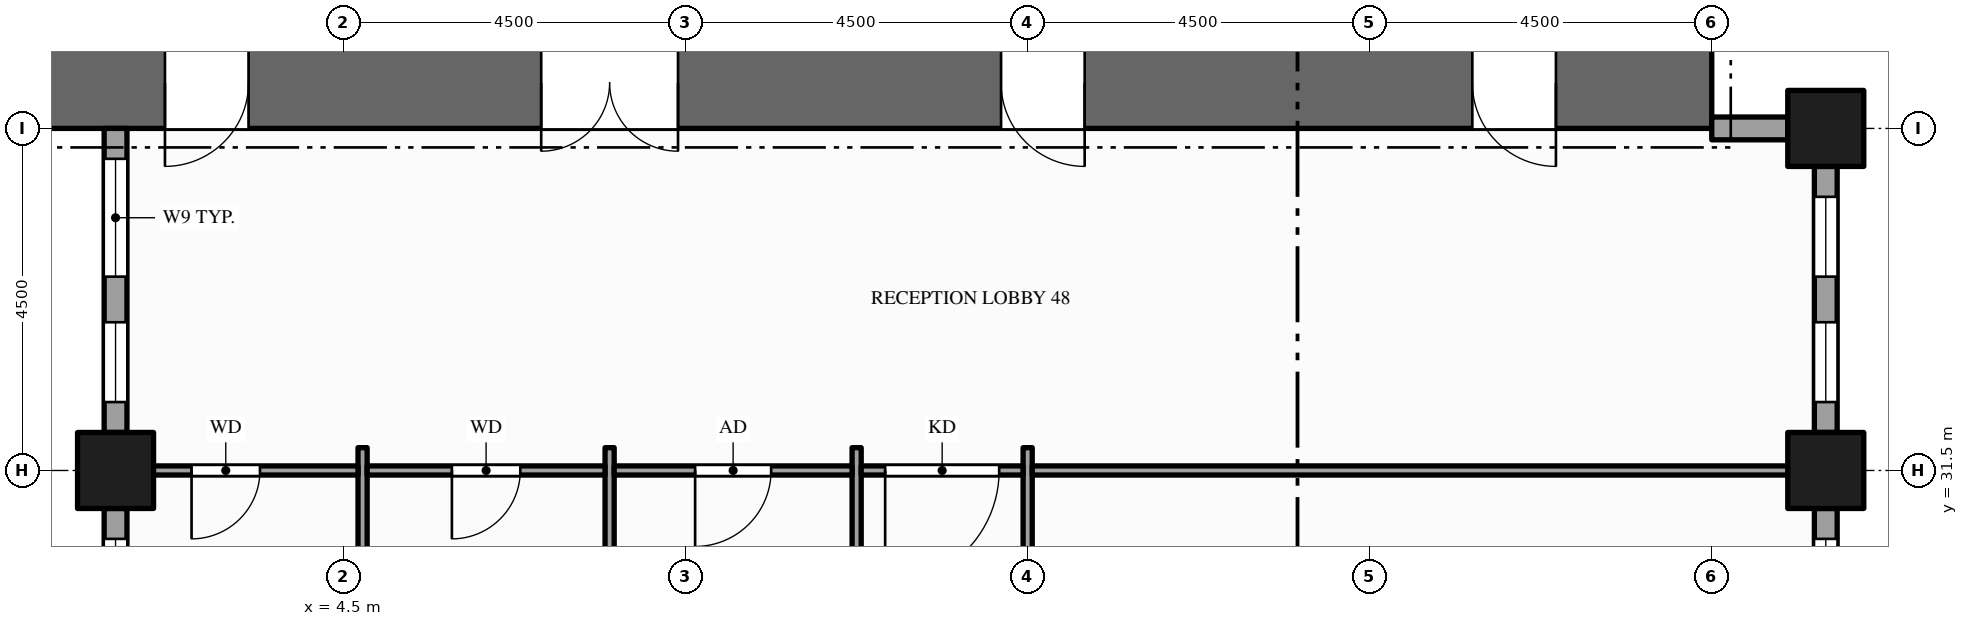
"""IFC4 building model, lengths in metres.
Left out: names, types, materials, properties, quantities, classifications, styles, units other than length and angle.
Written with IfcOpenShell. Run it as: python <this file> out.ifc"""

import sys

from ifc_helpers import new_model, si_unit, direction, frame, frame_2d, origin, origin_2d, place, context, subcontext, project, spatial, rectangle, hollow_rectangle, extrude, element, fill, save


model = new_model("IFC4")
c1 = context("Model", 3, precision=1e-05, world=origin(), true_north=direction((0.0, 1.0)))
c2 = subcontext(c1, "Body", "Model", "MODEL_VIEW")
j1 = project(units=[si_unit("LENGTHUNIT", "METRE"), si_unit("PLANEANGLEUNIT", "RADIAN")], contexts=[c1])
p1 = place(None, origin())
s1 = spatial("IfcSite", under=j1, at=p1, CompositionType="ELEMENT")
p2 = place(p1, origin())
s2 = spatial("IfcBuilding", under=s1, at=p2, CompositionType="ELEMENT")
p3 = place(p2, frame((0.0, 0.0, 83.0)))
s3 = spatial("IfcBuildingStorey", under=s2, at=p3, CompositionType="ELEMENT", Elevation=83.0)
p4 = place(p3, frame((0.0, 36.6, -0.15), z_axis=(0.0, 0.0, 1.0), x_axis=(1.0, 0.0, 0.0)))
e1 = element("IfcWall", 1, at=p4, inside=s3, PredefinedType="SHEAR", context=c2, shape_type="SweptSolid", body=[
    extrude(rectangle(XDim=22.5, YDim=1.2, at=frame_2d((11.25, 0.0))), origin(), (0.0, 0.0, 1.0), 4.0),
])
p5 = place(p4, frame((7.1, 0.0, 0.15)))
e2 = element("IfcOpeningElement", 2, at=p5, cuts=e1, PredefinedType="OPENING", context=c2, shape_type="SweptSolid", body=[
    extrude(rectangle(XDim=1.8, YDim=2.1, at=frame_2d((0.9, 1.05))), frame((0.0, 0.61, 0.0), z_axis=(0.0, -1.0, 0.0), x_axis=(1.0, 0.0, 0.0)), (0.0, 0.0, 1.0), 1.22),
])
p6 = place(p4, frame((13.15, 0.0, 0.15)))
e3 = element("IfcOpeningElement", 3, at=p6, cuts=e1, PredefinedType="OPENING", context=c2, shape_type="SweptSolid", body=[
    extrude(rectangle(XDim=1.1, YDim=2.1, at=frame_2d((0.55, 1.05))), frame((0.0, 0.61, 0.0), z_axis=(0.0, -1.0, 0.0), x_axis=(1.0, 0.0, 0.0)), (0.0, 0.0, 1.0), 1.22),
])
p7 = place(p4, frame((2.15, 0.0, 0.15)))
e4 = element("IfcOpeningElement", 4, at=p7, cuts=e1, PredefinedType="OPENING", context=c2, shape_type="SweptSolid", body=[
    extrude(rectangle(XDim=1.1, YDim=2.1, at=frame_2d((0.55, 1.05))), frame((0.0, 0.61, 0.0), z_axis=(0.0, -1.0, 0.0), x_axis=(1.0, 0.0, 0.0)), (0.0, 0.0, 1.0), 1.22),
])
p8 = place(p4, frame((19.35, 0.0, 0.15)))
e5 = element("IfcOpeningElement", 5, at=p8, cuts=e1, PredefinedType="OPENING", context=c2, shape_type="SweptSolid", body=[
    extrude(rectangle(XDim=1.1, YDim=2.1, at=frame_2d((0.55, 1.05))), frame((0.0, 0.61, 0.0), z_axis=(0.0, -1.0, 0.0), x_axis=(1.0, 0.0, 0.0)), (0.0, 0.0, 1.0), 1.22),
])
for number, where, z_axis, x_axis in (
    (6, (1.5, 31.5, -0.15), (0.0, 0.0, 1.0), (1.0, 0.0, 0.0)),
    (7, (24.0, 31.5, -0.15), (0.0, 0.0, 1.0), (1.0, 0.0, 0.0)),
    (8, (24.0, 36.0, -0.15), (0.0, 0.0, 1.0), (1.0, 0.0, 0.0)),
):
    element("IfcColumn", number, at=place(p3, frame(where, z_axis=z_axis, x_axis=x_axis)), inside=s3, PredefinedType="COLUMN", context=c2, shape_type="SweptSolid", body=[
        extrude(hollow_rectangle(XDim=1.0, YDim=1.0, WallThickness=0.05, at=origin_2d()), origin(), (0.0, 0.0, 1.0), 4.0),
    ])
p9 = place(p3, frame((24.0, 26.0, 0.0), z_axis=(0.0, 0.0, 1.0), x_axis=(0.0, 1.0, 0.0)))
e9 = element("IfcWall", 9, at=p9, inside=s3, PredefinedType="STANDARD", context=c2, shape_type="SweptSolid", body=[
    extrude(rectangle(XDim=5.0, YDim=0.3, at=frame_2d((2.5, 0.0))), origin(), (0.0, 0.0, 1.0), 3.154),
])
p10 = place(p9, frame((1.3, 0.0, 0.9)))
e10 = element("IfcOpeningElement", 10, at=p10, cuts=e9, PredefinedType="OPENING", context=c2, shape_type="SweptSolid", body=[
    extrude(rectangle(XDim=1.65, YDim=2.0, at=frame_2d((0.825, 1.0))), frame((0.0, 0.16, 0.0), z_axis=(0.0, -1.0, 0.0), x_axis=(1.0, 0.0, 0.0)), (0.0, 0.0, 1.0), 0.32),
])
p11 = place(p9, frame((3.55, 0.0, 0.9)))
e11 = element("IfcOpeningElement", 11, at=p11, cuts=e9, PredefinedType="OPENING", context=c2, shape_type="SweptSolid", body=[
    extrude(rectangle(XDim=1.05, YDim=2.0, at=frame_2d((0.525, 1.0))), frame((0.0, 0.16, 0.0), z_axis=(0.0, -1.0, 0.0), x_axis=(1.0, 0.0, 0.0)), (0.0, 0.0, 1.0), 0.32),
])
p12 = place(p3, frame((24.0, 32.0, 0.0), z_axis=(0.0, 0.0, 1.0), x_axis=(0.0, 1.0, 0.0)))
e12 = element("IfcWall", 12, at=p12, inside=s3, PredefinedType="STANDARD", context=c2, shape_type="SweptSolid", body=[
    extrude(rectangle(XDim=3.5, YDim=0.3, at=frame_2d((1.75, 0.0))), origin(), (0.0, 0.0, 1.0), 3.154),
])
p13 = place(p12, frame((0.4, 0.0, 0.9)))
e13 = element("IfcOpeningElement", 13, at=p13, cuts=e12, PredefinedType="OPENING", context=c2, shape_type="SweptSolid", body=[
    extrude(rectangle(XDim=1.05, YDim=2.0, at=frame_2d((0.525, 1.0))), frame((0.0, 0.16, 0.0), z_axis=(0.0, -1.0, 0.0), x_axis=(1.0, 0.0, 0.0)), (0.0, 0.0, 1.0), 0.32),
])
p14 = place(p12, frame((2.05, 0.0, 0.9)))
e14 = element("IfcOpeningElement", 14, at=p14, cuts=e12, PredefinedType="OPENING", context=c2, shape_type="SweptSolid", body=[
    extrude(rectangle(XDim=1.05, YDim=2.0, at=frame_2d((0.525, 1.0))), frame((0.0, 0.16, 0.0), z_axis=(0.0, -1.0, 0.0), x_axis=(1.0, 0.0, 0.0)), (0.0, 0.0, 1.0), 0.32),
])
p15 = place(p3, frame((23.5, 36.0, 0.0), z_axis=(0.0, 0.0, 1.0), x_axis=(-1.0, 0.0, 0.0)))
e15 = element("IfcWall", 15, at=p15, inside=s3, PredefinedType="STANDARD", context=c2, shape_type="SweptSolid", body=[
    extrude(rectangle(XDim=1.0, YDim=0.3, at=frame_2d((0.5, 0.0))), origin(), (0.0, 0.0, 1.0), 2.938),
])
p16 = place(p3, frame((1.5, 36.0, 0.0), z_axis=(0.0, 0.0, 1.0), x_axis=(0.0, -1.0, 0.0)))
e16 = element("IfcWall", 16, at=p16, inside=s3, PredefinedType="STANDARD", context=c2, shape_type="SweptSolid", body=[
    extrude(rectangle(XDim=4.0, YDim=0.3, at=frame_2d((2.0, 0.0))), origin(), (0.0, 0.0, 1.0), 3.154),
])
p17 = place(p16, frame((0.4, 0.0, 0.9)))
e17 = element("IfcOpeningElement", 17, at=p17, cuts=e16, PredefinedType="OPENING", context=c2, shape_type="SweptSolid", body=[
    extrude(rectangle(XDim=1.55, YDim=2.0, at=frame_2d((0.775, 1.0))), frame((0.0, 0.16, 0.0), z_axis=(0.0, -1.0, 0.0), x_axis=(1.0, 0.0, 0.0)), (0.0, 0.0, 1.0), 0.32),
])
p18 = place(p16, frame((2.55, 0.0, 0.9)))
e18 = element("IfcOpeningElement", 18, at=p18, cuts=e16, PredefinedType="OPENING", context=c2, shape_type="SweptSolid", body=[
    extrude(rectangle(XDim=1.05, YDim=2.0, at=frame_2d((0.525, 1.0))), frame((0.0, 0.16, 0.0), z_axis=(0.0, -1.0, 0.0), x_axis=(1.0, 0.0, 0.0)), (0.0, 0.0, 1.0), 0.32),
])
p19 = place(p3, frame((1.5, 31.0, 0.0), z_axis=(0.0, 0.0, 1.0), x_axis=(0.0, -1.0, 0.0)))
e19 = element("IfcWall", 19, at=p19, inside=s3, PredefinedType="STANDARD", context=c2, shape_type="SweptSolid", body=[
    extrude(rectangle(XDim=3.5, YDim=0.3, at=frame_2d((1.75, 0.0))), origin(), (0.0, 0.0, 1.0), 3.154),
])
p20 = place(p19, frame((0.4, 0.0, 0.9)))
e20 = element("IfcOpeningElement", 20, at=p20, cuts=e19, PredefinedType="OPENING", context=c2, shape_type="SweptSolid", body=[
    extrude(rectangle(XDim=1.05, YDim=2.0, at=frame_2d((0.525, 1.0))), frame((0.0, 0.16, 0.0), z_axis=(0.0, -1.0, 0.0), x_axis=(1.0, 0.0, 0.0)), (0.0, 0.0, 1.0), 0.32),
])
p21 = place(p19, frame((2.05, 0.0, 0.9)))
e21 = element("IfcOpeningElement", 21, at=p21, cuts=e19, PredefinedType="OPENING", context=c2, shape_type="SweptSolid", body=[
    extrude(rectangle(XDim=1.05, YDim=2.0, at=frame_2d((0.525, 1.0))), frame((0.0, 0.16, 0.0), z_axis=(0.0, -1.0, 0.0), x_axis=(1.0, 0.0, 0.0)), (0.0, 0.0, 1.0), 0.32),
])
for number, where, z_axis, x_axis in (
    (22, (4.75, 26.7, 0.0), (0.0, 0.0, 1.0), (0.0, 1.0, 0.0)),
    (23, (8.0, 26.7, 0.0), (0.0, 0.0, 1.0), (0.0, 1.0, 0.0)),
):
    element("IfcWall", number, at=place(p3, frame(where, z_axis=z_axis, x_axis=x_axis)), inside=s3, PredefinedType="PARTITIONING", context=c2, shape_type="SweptSolid", body=[
        extrude(rectangle(XDim=5.1, YDim=0.12, at=frame_2d((2.55, 0.0))), origin(), (0.0, 0.0, 1.0), 3.85),
    ])
p22 = place(p3, frame((11.25, 13.2, 0.0), z_axis=(0.0, 0.0, 1.0), x_axis=(0.0, 1.0, 0.0)))
e24 = element("IfcWall", 24, at=p22, inside=s3, PredefinedType="PARTITIONING", context=c2, shape_type="SweptSolid", body=[
    extrude(rectangle(XDim=18.6, YDim=0.12, at=frame_2d((9.3, 0.0))), origin(), (0.0, 0.0, 1.0), 2.6),
])
p23 = place(p22, frame((3.175, 0.0, 0.0)))
e25 = element("IfcOpeningElement", 25, at=p23, cuts=e24, PredefinedType="OPENING", context=c2, shape_type="SweptSolid", body=[
    extrude(rectangle(XDim=1.0, YDim=2.1, at=frame_2d((0.5, 1.05))), frame((0.0, 0.07, 0.0), z_axis=(0.0, -1.0, 0.0), x_axis=(1.0, 0.0, 0.0)), (0.0, 0.0, 1.0), 0.14),
])
p24 = place(p22, frame((9.855, 0.0, 0.0)))
e26 = element("IfcOpeningElement", 26, at=p24, cuts=e24, PredefinedType="OPENING", context=c2, shape_type="SweptSolid", body=[
    extrude(rectangle(XDim=1.2, YDim=2.1, at=frame_2d((0.6, 1.05))), frame((0.0, 0.07, 0.0), z_axis=(0.0, -1.0, 0.0), x_axis=(1.0, 0.0, 0.0)), (0.0, 0.0, 1.0), 0.14),
])
p25 = place(p3, frame((13.5, 13.2, 0.0), z_axis=(0.0, 0.0, 1.0), x_axis=(0.0, 1.0, 0.0)))
e27 = element("IfcWall", 27, at=p25, inside=s3, PredefinedType="PARTITIONING", context=c2, shape_type="SweptSolid", body=[
    extrude(rectangle(XDim=18.6, YDim=0.12, at=frame_2d((9.3, 0.0))), origin(), (0.0, 0.0, 1.0), 2.6),
])
p26 = place(p25, frame((15.55, 0.0, 0.0)))
e28 = element("IfcOpeningElement", 28, at=p26, cuts=e27, PredefinedType="OPENING", context=c2, shape_type="SweptSolid", body=[
    extrude(rectangle(XDim=1.0, YDim=2.1, at=frame_2d((0.5, 1.05))), frame((0.0, 0.07, 0.0), z_axis=(0.0, -1.0, 0.0), x_axis=(1.0, 0.0, 0.0)), (0.0, 0.0, 1.0), 0.14),
])
p27 = place(p25, frame((4.2, 0.0, 0.0)))
e29 = element("IfcOpeningElement", 29, at=p27, cuts=e27, PredefinedType="OPENING", context=c2, shape_type="SweptSolid", body=[
    extrude(rectangle(XDim=1.2, YDim=2.1, at=frame_2d((0.6, 1.05))), frame((0.0, 0.07, 0.0), z_axis=(0.0, -1.0, 0.0), x_axis=(1.0, 0.0, 0.0)), (0.0, 0.0, 1.0), 0.14),
])
p28 = place(p3, frame((1.65, 31.5, 0.0), z_axis=(0.0, 0.0, 1.0), x_axis=(1.0, 0.0, 0.0)))
e30 = element("IfcWall", 30, at=p28, inside=s3, PredefinedType="PARTITIONING", context=c2, shape_type="SweptSolid", body=[
    extrude(rectangle(XDim=3.04, YDim=0.12, at=frame_2d((1.52, 0.0))), origin(), (0.0, 0.0, 1.0), 2.938),
])
p29 = place(p28, frame((0.85, 0.0, 0.0)))
e31 = element("IfcOpeningElement", 31, at=p29, cuts=e30, PredefinedType="OPENING", context=c2, shape_type="SweptSolid", body=[
    extrude(rectangle(XDim=0.9, YDim=2.1, at=frame_2d((0.45, 1.05))), frame((0.0, 0.07, 0.0), z_axis=(0.0, -1.0, 0.0), x_axis=(1.0, 0.0, 0.0)), (0.0, 0.0, 1.0), 0.14),
])
p30 = place(p3, frame((4.81, 31.5, 0.0), z_axis=(0.0, 0.0, 1.0), x_axis=(1.0, 0.0, 0.0)))
e32 = element("IfcWall", 32, at=p30, inside=s3, PredefinedType="PARTITIONING", context=c2, shape_type="SweptSolid", body=[
    extrude(rectangle(XDim=3.13, YDim=0.12, at=frame_2d((1.565, 0.0))), origin(), (0.0, 0.0, 1.0), 2.938),
])
p31 = place(p30, frame((1.115, 0.0, 0.0)))
e33 = element("IfcOpeningElement", 33, at=p31, cuts=e32, PredefinedType="OPENING", context=c2, shape_type="SweptSolid", body=[
    extrude(rectangle(XDim=0.9, YDim=2.1, at=frame_2d((0.45, 1.05))), frame((0.0, 0.07, 0.0), z_axis=(0.0, -1.0, 0.0), x_axis=(1.0, 0.0, 0.0)), (0.0, 0.0, 1.0), 0.14),
])
p32 = place(p3, frame((8.06, 31.5, 0.0), z_axis=(0.0, 0.0, 1.0), x_axis=(1.0, 0.0, 0.0)))
e34 = element("IfcWall", 34, at=p32, inside=s3, PredefinedType="PARTITIONING", context=c2, shape_type="SweptSolid", body=[
    extrude(rectangle(XDim=3.13, YDim=0.12, at=frame_2d((1.565, 0.0))), origin(), (0.0, 0.0, 1.0), 2.938),
])
p33 = place(p32, frame((1.065, 0.0, 0.0)))
e35 = element("IfcOpeningElement", 35, at=p33, cuts=e34, PredefinedType="OPENING", context=c2, shape_type="SweptSolid", body=[
    extrude(rectangle(XDim=1.0, YDim=2.1, at=frame_2d((0.5, 1.05))), frame((0.0, 0.07, 0.0), z_axis=(0.0, -1.0, 0.0), x_axis=(1.0, 0.0, 0.0)), (0.0, 0.0, 1.0), 0.14),
])
p34 = place(p3, frame((11.31, 31.5, 0.0), z_axis=(0.0, 0.0, 1.0), x_axis=(1.0, 0.0, 0.0)))
e36 = element("IfcWall", 36, at=p34, inside=s3, PredefinedType="PARTITIONING", context=c2, shape_type="SweptSolid", body=[
    extrude(rectangle(XDim=2.13, YDim=0.12, at=frame_2d((1.065, 0.0))), origin(), (0.0, 0.0, 1.0), 2.938),
])
p35 = place(p34, frame((0.315, 0.0, 0.0)))
e37 = element("IfcOpeningElement", 37, at=p35, cuts=e36, PredefinedType="OPENING", context=c2, shape_type="SweptSolid", body=[
    extrude(rectangle(XDim=1.5, YDim=2.1, at=frame_2d((0.75, 1.05))), frame((0.0, 0.07, 0.0), z_axis=(0.0, -1.0, 0.0), x_axis=(1.0, 0.0, 0.0)), (0.0, 0.0, 1.0), 0.14),
])
p36 = place(p3, frame((13.56, 31.5, 0.0), z_axis=(0.0, 0.0, 1.0), x_axis=(1.0, 0.0, 0.0)))
e38 = element("IfcWall", 38, at=p36, inside=s3, PredefinedType="PARTITIONING", context=c2, shape_type="SweptSolid", body=[
    extrude(rectangle(XDim=10.29, YDim=0.12, at=frame_2d((5.145, 0.0))), origin(), (0.0, 0.0, 1.0), 2.938),
])
p37 = place(p11, origin())
e39 = element("IfcWindow", 39, at=p37, inside=s3, PartitioningType="SINGLE_PANEL", PredefinedType="WINDOW", context=c2, shape_type="SweptSolid", body=[
    extrude(rectangle(XDim=1.05, YDim=2.0, at=frame_2d((0.525, 1.0))), frame((0.0, 0.03, 0.0), z_axis=(0.0, -1.0, 0.0), x_axis=(1.0, 0.0, 0.0)), (0.0, 0.0, 1.0), 0.06),
])
fill(e11, e39)
p38 = place(p13, origin())
e40 = element("IfcWindow", 40, at=p38, inside=s3, PartitioningType="SINGLE_PANEL", PredefinedType="WINDOW", context=c2, shape_type="SweptSolid", body=[
    extrude(rectangle(XDim=1.05, YDim=2.0, at=frame_2d((0.525, 1.0))), frame((0.0, 0.03, 0.0), z_axis=(0.0, -1.0, 0.0), x_axis=(1.0, 0.0, 0.0)), (0.0, 0.0, 1.0), 0.06),
])
fill(e13, e40)
p39 = place(p14, origin())
e41 = element("IfcWindow", 41, at=p39, inside=s3, PartitioningType="SINGLE_PANEL", PredefinedType="WINDOW", context=c2, shape_type="SweptSolid", body=[
    extrude(rectangle(XDim=1.05, YDim=2.0, at=frame_2d((0.525, 1.0))), frame((0.0, 0.03, 0.0), z_axis=(0.0, -1.0, 0.0), x_axis=(1.0, 0.0, 0.0)), (0.0, 0.0, 1.0), 0.06),
])
fill(e14, e41)
p40 = place(p17, origin())
e42 = element("IfcWindow", 42, at=p40, inside=s3, PartitioningType="SINGLE_PANEL", PredefinedType="WINDOW", context=c2, shape_type="SweptSolid", body=[
    extrude(rectangle(XDim=1.55, YDim=2.0, at=frame_2d((0.775, 1.0))), frame((0.0, 0.03, 0.0), z_axis=(0.0, -1.0, 0.0), x_axis=(1.0, 0.0, 0.0)), (0.0, 0.0, 1.0), 0.06),
])
fill(e17, e42)
p41 = place(p18, origin())
e43 = element("IfcWindow", 43, at=p41, inside=s3, PartitioningType="SINGLE_PANEL", PredefinedType="WINDOW", context=c2, shape_type="SweptSolid", body=[
    extrude(rectangle(XDim=1.05, YDim=2.0, at=frame_2d((0.525, 1.0))), frame((0.0, 0.03, 0.0), z_axis=(0.0, -1.0, 0.0), x_axis=(1.0, 0.0, 0.0)), (0.0, 0.0, 1.0), 0.06),
])
fill(e18, e43)
p42 = place(p20, origin())
e44 = element("IfcWindow", 44, at=p42, inside=s3, PartitioningType="SINGLE_PANEL", PredefinedType="WINDOW", context=c2, shape_type="SweptSolid", body=[
    extrude(rectangle(XDim=1.05, YDim=2.0, at=frame_2d((0.525, 1.0))), frame((0.0, 0.03, 0.0), z_axis=(0.0, -1.0, 0.0), x_axis=(1.0, 0.0, 0.0)), (0.0, 0.0, 1.0), 0.06),
])
fill(e20, e44)
p43 = place(p5, origin())
e45 = element("IfcDoor", 45, at=p43, inside=s3, OperationType="DOUBLE_DOOR_SINGLE_SWING", PredefinedType="DOOR", context=c2, shape_type="SweptSolid", body=[
    extrude(rectangle(XDim=1.8, YDim=2.1, at=frame_2d((0.9, 1.05))), frame((0.0, 0.025, 0.0), z_axis=(0.0, -1.0, 0.0), x_axis=(1.0, 0.0, 0.0)), (0.0, 0.0, 1.0), 0.05),
])
fill(e2, e45)
p44 = place(p6, origin())
e46 = element("IfcDoor", 46, at=p44, inside=s3, OperationType="SINGLE_SWING_RIGHT", PredefinedType="DOOR", context=c2, shape_type="SweptSolid", body=[
    extrude(rectangle(XDim=1.1, YDim=2.1, at=frame_2d((0.55, 1.05))), frame((0.0, 0.025, 0.0), z_axis=(0.0, -1.0, 0.0), x_axis=(1.0, 0.0, 0.0)), (0.0, 0.0, 1.0), 0.05),
])
fill(e3, e46)
p45 = place(p7, origin())
e47 = element("IfcDoor", 47, at=p45, inside=s3, OperationType="SINGLE_SWING_LEFT", PredefinedType="DOOR", context=c2, shape_type="SweptSolid", body=[
    extrude(rectangle(XDim=1.1, YDim=2.1, at=frame_2d((0.55, 1.05))), frame((0.0, 0.025, 0.0), z_axis=(0.0, -1.0, 0.0), x_axis=(1.0, 0.0, 0.0)), (0.0, 0.0, 1.0), 0.05),
])
fill(e4, e47)
p46 = place(p8, origin())
e48 = element("IfcDoor", 48, at=p46, inside=s3, OperationType="SINGLE_SWING_RIGHT", PredefinedType="DOOR", context=c2, shape_type="SweptSolid", body=[
    extrude(rectangle(XDim=1.1, YDim=2.1, at=frame_2d((0.55, 1.05))), frame((0.0, 0.025, 0.0), z_axis=(0.0, -1.0, 0.0), x_axis=(1.0, 0.0, 0.0)), (0.0, 0.0, 1.0), 0.05),
])
fill(e5, e48)
p47 = place(p35, origin())
e49 = element("IfcDoor", 49, at=p47, inside=s3, OperationType="SINGLE_SWING_LEFT", PredefinedType="DOOR", context=c2, shape_type="SweptSolid", body=[
    extrude(rectangle(XDim=1.5, YDim=2.1, at=frame_2d((0.75, 1.05))), frame((0.0, 0.025, 0.0), z_axis=(0.0, -1.0, 0.0), x_axis=(1.0, 0.0, 0.0)), (0.0, 0.0, 1.0), 0.05),
])
fill(e37, e49)
p48 = place(p29, origin())
e50 = element("IfcDoor", 50, at=p48, inside=s3, OperationType="SINGLE_SWING_LEFT", PredefinedType="DOOR", context=c2, shape_type="SweptSolid", body=[
    extrude(rectangle(XDim=0.9, YDim=2.1, at=frame_2d((0.45, 1.05))), frame((0.0, 0.025, 0.0), z_axis=(0.0, -1.0, 0.0), x_axis=(1.0, 0.0, 0.0)), (0.0, 0.0, 1.0), 0.05),
])
fill(e31, e50)
p49 = place(p31, origin())
e51 = element("IfcDoor", 51, at=p49, inside=s3, OperationType="SINGLE_SWING_LEFT", PredefinedType="DOOR", context=c2, shape_type="SweptSolid", body=[
    extrude(rectangle(XDim=0.9, YDim=2.1, at=frame_2d((0.45, 1.05))), frame((0.0, 0.025, 0.0), z_axis=(0.0, -1.0, 0.0), x_axis=(1.0, 0.0, 0.0)), (0.0, 0.0, 1.0), 0.05),
])
fill(e33, e51)
p50 = place(p33, origin())
e52 = element("IfcDoor", 52, at=p50, inside=s3, OperationType="SINGLE_SWING_LEFT", PredefinedType="DOOR", context=c2, shape_type="SweptSolid", body=[
    extrude(rectangle(XDim=1.0, YDim=2.1, at=frame_2d((0.5, 1.05))), frame((0.0, 0.025, 0.0), z_axis=(0.0, -1.0, 0.0), x_axis=(1.0, 0.0, 0.0)), (0.0, 0.0, 1.0), 0.05),
])
fill(e35, e52)
save(model, sys.argv[1])
